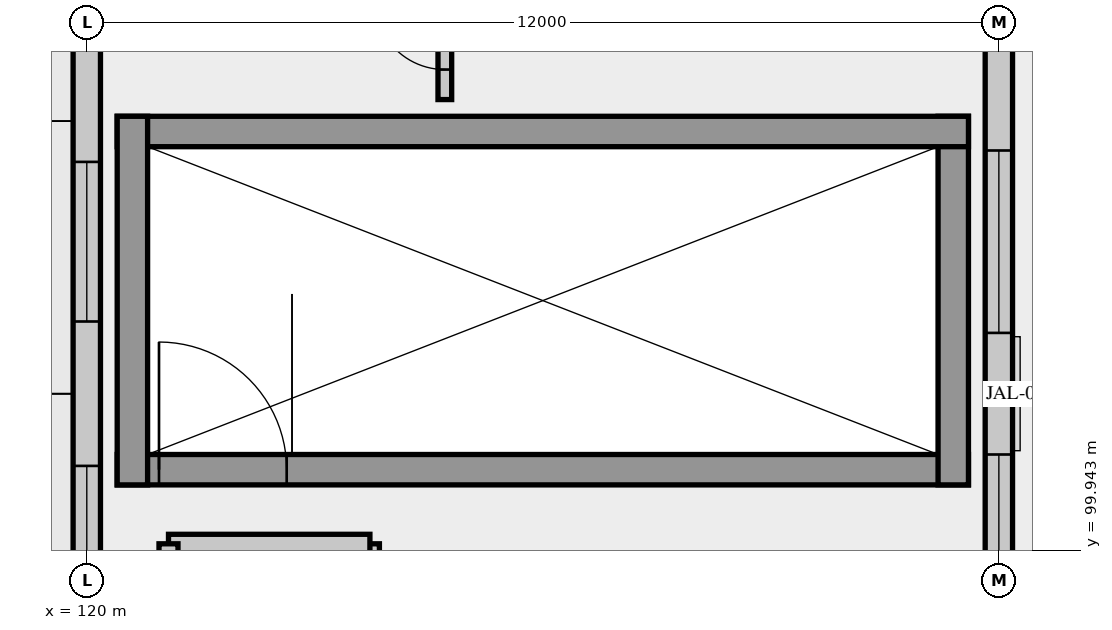
"""IFC4 building model, lengths in metres.
Left out: names, types, materials, properties, quantities, classifications, styles, units other than length and angle.
Written with IfcOpenShell. Run it as: python <this file> out.ifc"""

import sys

from ifc_helpers import new_model, si_unit, direction, frame, frame_2d, origin, place, context, subcontext, project, spatial, rectangle, extrude, element, fill, save


model = new_model("IFC4")
c1 = context("Model", 3, precision=1e-05, world=origin(), true_north=direction((0.0, 1.0)))
c2 = subcontext(c1, "Body", "Model", "MODEL_VIEW")
j1 = project(units=[si_unit("LENGTHUNIT", "METRE"), si_unit("PLANEANGLEUNIT", "RADIAN")], contexts=[c1])
p1 = place(None, origin())
s1 = spatial("IfcSite", under=j1, at=p1, CompositionType="ELEMENT")
p2 = place(p1, origin())
s2 = spatial("IfcBuilding", under=s1, at=p2, CompositionType="ELEMENT")
p3 = place(p2, frame((0.0, 0.0, 23.4)))
s3 = spatial("IfcBuildingStorey", under=s2, at=p3, CompositionType="ELEMENT", Elevation=23.4)
p4 = place(p3, frame((120.0, 108.0, 0.0), z_axis=(0.0, 0.0, 1.0), x_axis=(0.0, -1.0, 0.0)))
e1 = element("IfcWall", 1, at=p4, inside=s3, PredefinedType="SOLIDWALL", context=c2, shape_type="SweptSolid", body=[
    extrude(rectangle(XDim=12.0, YDim=0.36, at=frame_2d((6.0, 0.0))), origin(), (0.0, 0.0, 1.0), 3.98),
])
p5 = place(p4, frame((2.95, 0.0, 0.95)))
e2 = element("IfcOpeningElement", 2, at=p5, cuts=e1, PredefinedType="OPENING", context=c2, shape_type="SweptSolid", body=[
    extrude(rectangle(XDim=2.1, YDim=2.1, at=frame_2d((1.05, 1.05))), frame((0.0, 0.19, 0.0), z_axis=(0.0, -1.0, 0.0), x_axis=(1.0, 0.0, 0.0)), (0.0, 0.0, 1.0), 0.38),
])
p6 = place(p4, frame((6.95, 0.0, 0.95)))
e3 = element("IfcOpeningElement", 3, at=p6, cuts=e1, PredefinedType="OPENING", context=c2, shape_type="SweptSolid", body=[
    extrude(rectangle(XDim=2.1, YDim=2.1, at=frame_2d((1.05, 1.05))), frame((0.0, 0.19, 0.0), z_axis=(0.0, -1.0, 0.0), x_axis=(1.0, 0.0, 0.0)), (0.0, 0.0, 1.0), 0.38),
])
p7 = place(p3, frame((132.0, 96.0, 0.0), z_axis=(0.0, 0.0, 1.0), x_axis=(0.0, 1.0, 0.0)))
e4 = element("IfcWall", 4, at=p7, inside=s3, PredefinedType="SOLIDWALL", context=c2, shape_type="SweptSolid", body=[
    extrude(rectangle(XDim=12.0, YDim=0.36, at=frame_2d((6.0, 0.0))), origin(), (0.0, 0.0, 1.0), 3.98),
])
p8 = place(p7, frame((2.8, 0.0, 0.95)))
e5 = element("IfcOpeningElement", 5, at=p8, cuts=e4, PredefinedType="OPENING", context=c2, shape_type="SweptSolid", body=[
    extrude(rectangle(XDim=2.4, YDim=2.1, at=frame_2d((1.2, 1.05))), frame((0.0, 0.19, 0.0), z_axis=(0.0, -1.0, 0.0), x_axis=(1.0, 0.0, 0.0)), (0.0, 0.0, 1.0), 0.38),
])
p9 = place(p7, frame((6.8, 0.0, 0.95)))
e6 = element("IfcOpeningElement", 6, at=p9, cuts=e4, PredefinedType="OPENING", context=c2, shape_type="SweptSolid", body=[
    extrude(rectangle(XDim=2.4, YDim=2.1, at=frame_2d((1.2, 1.05))), frame((0.0, 0.19, 0.0), z_axis=(0.0, -1.0, 0.0), x_axis=(1.0, 0.0, 0.0)), (0.0, 0.0, 1.0), 0.38),
])
p10 = place(p3, frame((120.4, 101.0, 0.0), z_axis=(0.0, 0.0, 1.0), x_axis=(1.0, 0.0, 0.0)))
e7 = element("IfcWall", 7, at=p10, inside=s3, PredefinedType="SHEAR", context=c2, shape_type="SweptSolid", body=[
    extrude(rectangle(XDim=11.2, YDim=0.4, at=frame_2d((5.6, 0.0))), origin(), (0.0, 0.0, 1.0), 4.56),
])
p11 = place(p10, frame((0.55, 0.0, 0.0)))
e8 = element("IfcOpeningElement", 8, at=p11, cuts=e7, PredefinedType="OPENING", context=c2, shape_type="SweptSolid", body=[
    extrude(rectangle(XDim=1.68, YDim=2.35, at=frame_2d((0.84, 1.175))), frame((0.0, 0.21, 0.0), z_axis=(0.0, -1.0, 0.0), x_axis=(1.0, 0.0, 0.0)), (0.0, 0.0, 1.0), 0.42),
])
p12 = place(p3, frame((131.4, 100.8, 0.0), z_axis=(0.0, 0.0, 1.0), x_axis=(0.0, 1.0, 0.0)))
e9 = element("IfcWall", 9, at=p12, inside=s3, PredefinedType="SHEAR", context=c2, shape_type="SweptSolid", body=[
    extrude(rectangle(XDim=4.85, YDim=0.4, at=frame_2d((2.425, 0.0))), origin(), (0.0, 0.0, 1.0), 4.56),
])
p13 = place(p3, frame((131.6, 105.45, 0.0), z_axis=(0.0, 0.0, 1.0), x_axis=(-1.0, 0.0, 0.0)))
e10 = element("IfcWall", 10, at=p13, inside=s3, PredefinedType="SHEAR", context=c2, shape_type="SweptSolid", body=[
    extrude(rectangle(XDim=11.2, YDim=0.4, at=frame_2d((5.6, 0.0))), origin(), (0.0, 0.0, 1.0), 4.56),
])
p14 = place(p3, frame((120.6, 105.65, 0.0), z_axis=(0.0, 0.0, 1.0), x_axis=(0.0, -1.0, 0.0)))
e11 = element("IfcWall", 11, at=p14, inside=s3, PredefinedType="SHEAR", context=c2, shape_type="SweptSolid", body=[
    extrude(rectangle(XDim=4.85, YDim=0.4, at=frame_2d((2.425, 0.0))), origin(), (0.0, 0.0, 1.0), 4.56),
])
p15 = place(p3, frame((123.725, 96.775, 0.0), z_axis=(0.0, 0.0, 1.0), x_axis=(0.0, 1.0, 0.0)))
e12 = element("IfcWall", 12, at=p15, inside=s3, PredefinedType="SOLIDWALL", context=c2, shape_type="SweptSolid", body=[
    extrude(rectangle(XDim=3.25, YDim=0.25, at=frame_2d((1.625, 0.0))), origin(), (0.0, 0.0, 1.0), 4.54),
])
p16 = place(p15, frame((0.925, 0.0, 0.0)))
e13 = element("IfcOpeningElement", 13, at=p16, cuts=e12, PredefinedType="OPENING", context=c2, shape_type="SweptSolid", body=[
    extrude(rectangle(XDim=1.4, YDim=2.3, at=frame_2d((0.7, 1.15))), frame((0.0, 0.135, 0.0), z_axis=(0.0, -1.0, 0.0), x_axis=(1.0, 0.0, 0.0)), (0.0, 0.0, 1.0), 0.27),
])
p17 = place(p3, frame((123.725, 100.025, 0.0), z_axis=(0.0, 0.0, 1.0), x_axis=(-1.0, 0.0, 0.0)))
e14 = element("IfcWall", 14, at=p17, inside=s3, PredefinedType="SOLIDWALL", context=c2, shape_type="SweptSolid", body=[
    extrude(rectangle(XDim=2.65, YDim=0.25, at=frame_2d((1.325, 0.0))), origin(), (0.0, 0.0, 1.0), 4.54),
])
p18 = place(p3, frame((121.075, 100.025, 0.0), z_axis=(0.0, 0.0, 1.0), x_axis=(0.0, -1.0, 0.0)))
e15 = element("IfcWall", 15, at=p18, inside=s3, PredefinedType="SOLIDWALL", context=c2, shape_type="SweptSolid", body=[
    extrude(rectangle(XDim=3.25, YDim=0.25, at=frame_2d((1.625, 0.0))), origin(), (0.0, 0.0, 1.0), 4.54),
])
p19 = place(p3, frame((124.711, 105.87, 0.0), z_axis=(0.0, 0.0, 1.0), x_axis=(0.0, 1.0, 0.0)))
e16 = element("IfcWall", 16, at=p19, inside=s3, PredefinedType="PARTITIONING", context=c2, shape_type="SweptSolid", body=[
    extrude(rectangle(XDim=1.75, YDim=0.18, at=frame_2d((0.875, 0.0))), origin(), (0.0, 0.0, 1.0), 4.54),
])
p20 = place(p19, frame((0.395, 0.0, 0.0)))
e17 = element("IfcOpeningElement", 17, at=p20, cuts=e16, PredefinedType="OPENING", context=c2, shape_type="SweptSolid", body=[
    extrude(rectangle(XDim=0.92, YDim=2.15, at=frame_2d((0.46, 1.075))), frame((0.0, 0.1, 0.0), z_axis=(0.0, -1.0, 0.0), x_axis=(1.0, 0.0, 0.0)), (0.0, 0.0, 1.0), 0.2),
])
p21 = place(p5, origin())
e18 = element("IfcWindow", 18, at=p21, inside=s3, PartitioningType="SINGLE_PANEL", PredefinedType="WINDOW", context=c2, shape_type="SweptSolid", body=[
    extrude(rectangle(XDim=2.1, YDim=2.1, at=frame_2d((1.05, 1.05))), frame((0.0, 0.03, 0.0), z_axis=(0.0, -1.0, 0.0), x_axis=(1.0, 0.0, 0.0)), (0.0, 0.0, 1.0), 0.06),
])
fill(e2, e18)
p22 = place(p6, origin())
e19 = element("IfcWindow", 19, at=p22, inside=s3, PartitioningType="SINGLE_PANEL", PredefinedType="WINDOW", context=c2, shape_type="SweptSolid", body=[
    extrude(rectangle(XDim=2.1, YDim=2.1, at=frame_2d((1.05, 1.05))), frame((0.0, 0.03, 0.0), z_axis=(0.0, -1.0, 0.0), x_axis=(1.0, 0.0, 0.0)), (0.0, 0.0, 1.0), 0.06),
])
fill(e3, e19)
p23 = place(p8, origin())
e20 = element("IfcWindow", 20, at=p23, inside=s3, PartitioningType="SINGLE_PANEL", PredefinedType="WINDOW", context=c2, shape_type="SweptSolid", body=[
    extrude(rectangle(XDim=2.4, YDim=2.1, at=frame_2d((1.2, 1.05))), frame((0.0, 0.03, 0.0), z_axis=(0.0, -1.0, 0.0), x_axis=(1.0, 0.0, 0.0)), (0.0, 0.0, 1.0), 0.06),
])
fill(e5, e20)
p24 = place(p9, origin())
e21 = element("IfcWindow", 21, at=p24, inside=s3, PartitioningType="SINGLE_PANEL", PredefinedType="WINDOW", context=c2, shape_type="SweptSolid", body=[
    extrude(rectangle(XDim=2.4, YDim=2.1, at=frame_2d((1.2, 1.05))), frame((0.0, 0.03, 0.0), z_axis=(0.0, -1.0, 0.0), x_axis=(1.0, 0.0, 0.0)), (0.0, 0.0, 1.0), 0.06),
])
fill(e6, e21)
p25 = place(p11, origin())
e22 = element("IfcDoor", 22, at=p25, inside=s3, OperationType="DOUBLE_DOOR_SINGLE_SWING", PredefinedType="DOOR", context=c2, shape_type="SweptSolid", body=[
    extrude(rectangle(XDim=1.68, YDim=2.35, at=frame_2d((0.84, 1.175))), frame((0.0, 0.025, 0.0), z_axis=(0.0, -1.0, 0.0), x_axis=(1.0, 0.0, 0.0)), (0.0, 0.0, 1.0), 0.05),
])
fill(e8, e22)
p26 = place(p20, origin())
e23 = element("IfcDoor", 23, at=p26, inside=s3, OperationType="SINGLE_SWING_RIGHT", PredefinedType="DOOR", context=c2, shape_type="SweptSolid", body=[
    extrude(rectangle(XDim=0.92, YDim=2.15, at=frame_2d((0.46, 1.075))), frame((0.0, 0.025, 0.0), z_axis=(0.0, -1.0, 0.0), x_axis=(1.0, 0.0, 0.0)), (0.0, 0.0, 1.0), 0.05),
])
fill(e17, e23)
save(model, sys.argv[1])
